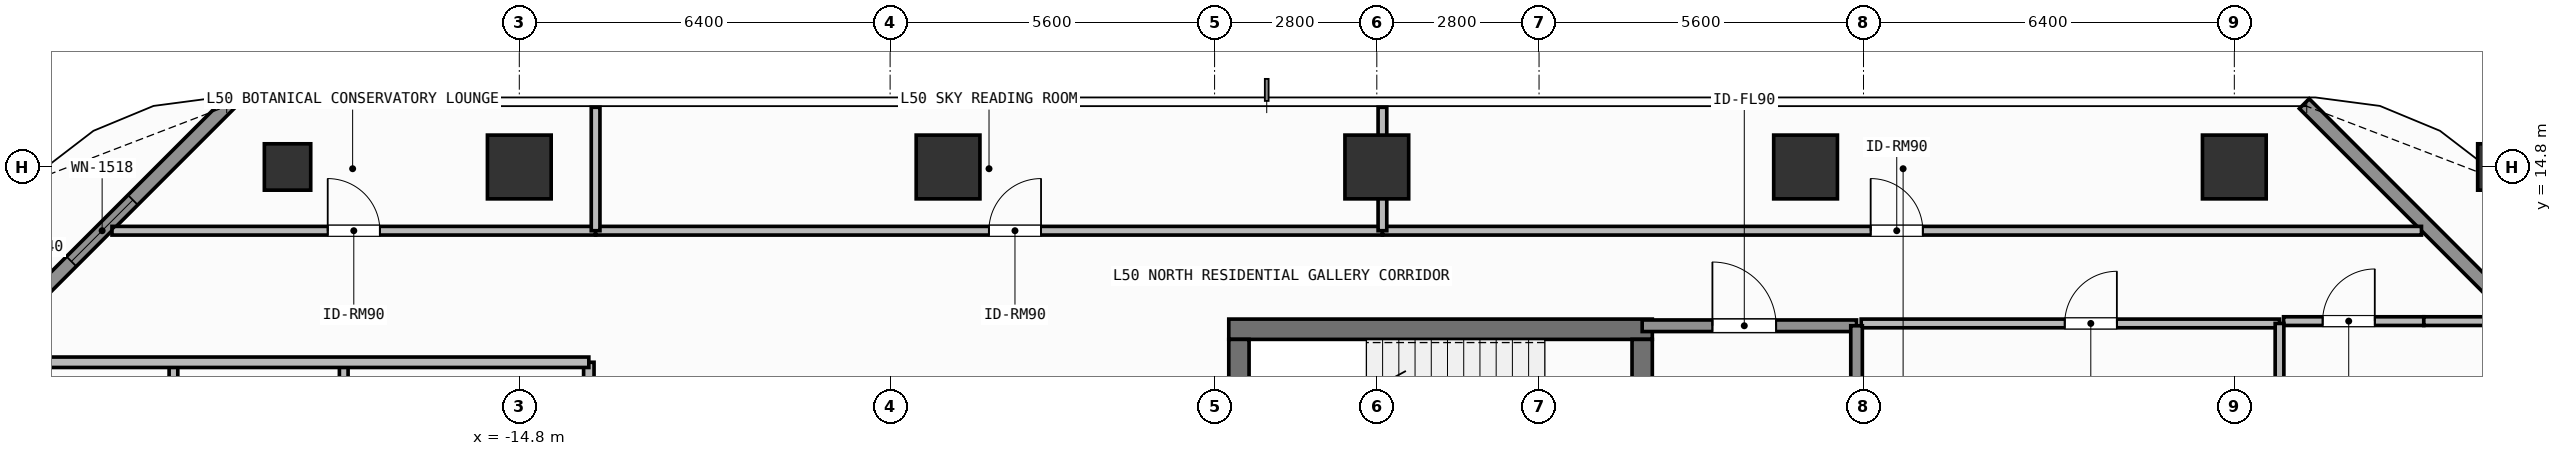
"""IFC4 building model, lengths in metres.
Left out: names, types, materials, properties, quantities, classifications, styles, units other than length and angle.
Written with IfcOpenShell. Run it as: python <this file> out.ifc"""

import sys

from ifc_helpers import new_model, si_unit, direction, frame, frame_2d, origin, origin_2d, place, context, subcontext, project, spatial, rectangle, hollow_rectangle, extrude, element, fill, save


model = new_model("IFC4")
c1 = context("Model", 3, precision=1e-05, world=origin(), true_north=direction((0.0, 1.0)))
c2 = subcontext(c1, "Body", "Model", "MODEL_VIEW")
j1 = project(units=[si_unit("LENGTHUNIT", "METRE"), si_unit("PLANEANGLEUNIT", "RADIAN")], contexts=[c1])
p1 = place(None, origin())
s1 = spatial("IfcSite", under=j1, at=p1, CompositionType="ELEMENT")
p2 = place(p1, origin())
s2 = spatial("IfcBuilding", under=s1, at=p2, CompositionType="ELEMENT")
p3 = place(p2, frame((0.0, 0.0, 203.1)))
s3 = spatial("IfcBuildingStorey", under=s2, at=p3, CompositionType="ELEMENT", Elevation=203.1)
p4 = place(p3, frame((-2.555, 12.0, 0.0), z_axis=(0.0, 0.0, 1.0), x_axis=(1.0, 0.0, 0.0)))
e1 = element("IfcWall", 1, at=p4, inside=s3, PredefinedType="SHEAR", context=c2, shape_type="SweptSolid", body=[
    extrude(rectangle(XDim=7.31, YDim=0.35, at=frame_2d((3.655, 0.0))), origin(), (0.0, 0.0, 1.0), 3.9),
])
p5 = place(p3, frame((-2.38, 8.9, 0.0), z_axis=(0.0, 0.0, 1.0), x_axis=(0.0, 1.0, 0.0)))
e2 = element("IfcWall", 2, at=p5, inside=s3, PredefinedType="SHEAR", context=c2, shape_type="SweptSolid", body=[
    extrude(rectangle(XDim=2.925, YDim=0.35, at=frame_2d((1.462, 0.0))), origin(), (0.0, 0.0, 1.0), 3.9),
])
p6 = place(p3, frame((4.58, 11.825, 0.0), z_axis=(0.0, 0.0, 1.0), x_axis=(0.0, -1.0, 0.0)))
e3 = element("IfcWall", 3, at=p6, inside=s3, PredefinedType="SHEAR", context=c2, shape_type="SweptSolid", body=[
    extrude(rectangle(XDim=2.925, YDim=0.35, at=frame_2d((1.462, 0.0))), origin(), (0.0, 0.0, 1.0), 3.9),
])
p7 = place(p6, frame((0.913, 0.0, 0.0)))
e4 = element("IfcOpeningElement", 4, at=p7, cuts=e3, PredefinedType="OPENING", context=c2, shape_type="SweptSolid", body=[
    extrude(rectangle(XDim=1.1, YDim=2.15, at=frame_2d((0.55, 1.075))), frame((0.0, 0.185, 0.0), z_axis=(0.0, -1.0, 0.0), x_axis=(1.0, 0.0, 0.0)), (0.0, 0.0, 1.0), 0.37),
])
for number, where, z_axis, x_axis in (
    (5, (-14.8, 14.8, 0.0), (0.0, 0.0, 1.0), (1.0, 0.0, 0.0)),
    (6, (-7.4, 14.8, 0.0), (0.0, 0.0, 1.0), (1.0, 0.0, 0.0)),
    (7, (0.0, 14.8, 0.0), (0.0, 0.0, 1.0), (1.0, 0.0, 0.0)),
    (8, (7.4, 14.8, 0.0), (0.0, 0.0, 1.0), (1.0, 0.0, 0.0)),
    (9, (14.8, 14.8, 0.0), (0.0, 0.0, 1.0), (1.0, 0.0, 0.0)),
):
    element("IfcColumn", number, at=place(p3, frame(where, z_axis=z_axis, x_axis=x_axis)), inside=s3, PredefinedType="COLUMN", context=c2, shape_type="SweptSolid", body=[
        extrude(rectangle(XDim=1.1, YDim=1.1, at=origin_2d()), origin(), (0.0, 0.0, 1.0), 3.9),
    ])
for number, where, z_axis, x_axis in (
    (10, (-18.8, 14.8, 0.0), (0.0, 0.0, 1.0), (1.0, 0.0, 0.0)),
    (11, (19.4, 14.8, 0.0), (0.0, 0.0, 1.0), (1.0, 0.0, 0.0)),
):
    element("IfcColumn", number, at=place(p3, frame(where, z_axis=z_axis, x_axis=x_axis)), inside=s3, PredefinedType="COLUMN", context=c2, shape_type="SweptSolid", body=[
        extrude(hollow_rectangle(XDim=0.8, YDim=0.8, WallThickness=0.036, at=origin_2d()), origin(), (0.0, 0.0, 1.0), 3.9),
    ])
p8 = place(p3, frame((-24.192, 11.508, 0.0), z_axis=(0.0, 0.0, 1.0), x_axis=(0.707106781187, 0.707106781187, 0.0)))
e12 = element("IfcWall", 12, at=p8, inside=s3, PredefinedType="SOLIDWALL", context=c2, shape_type="SweptSolid", body=[
    extrude(rectangle(XDim=6.201, YDim=0.24, at=frame_2d((3.101, 0.0))), origin(), (0.0, 0.0, 1.0), 3.68),
])
p9 = place(p8, frame((2.351, 0.0, 0.8)))
e13 = element("IfcOpeningElement", 13, at=p9, cuts=e12, PredefinedType="OPENING", context=c2, shape_type="SweptSolid", body=[
    extrude(rectangle(XDim=1.5, YDim=1.85, at=frame_2d((0.75, 0.925))), frame((0.0, 0.13, 0.0), z_axis=(0.0, -1.0, 0.0), x_axis=(1.0, 0.0, 0.0)), (0.0, 0.0, 1.0), 0.26),
])
p10 = place(p3, frame((16.008, 15.892, 0.0), z_axis=(0.0, 0.0, 1.0), x_axis=(0.707106781187, -0.707106781187, 0.0)))
e14 = element("IfcWall", 14, at=p10, inside=s3, PredefinedType="SOLIDWALL", context=c2, shape_type="SweptSolid", body=[
    extrude(rectangle(XDim=6.201, YDim=0.24, at=frame_2d((3.101, 0.0))), origin(), (0.0, 0.0, 1.0), 3.68),
])
p11 = place(p3, frame((4.58, 12.06, 0.0), z_axis=(0.0, 0.0, 1.0), x_axis=(1.0, 0.0, 0.0)))
e15 = element("IfcWall", 15, at=p11, inside=s3, PredefinedType="SOLIDWALL", context=c2, shape_type="SweptSolid", body=[
    extrude(rectangle(XDim=3.7, YDim=0.2, at=frame_2d((1.85, 0.0))), origin(), (0.0, 0.0, 1.0), 3.68),
])
p12 = place(p11, frame((1.212, 0.0, 0.0)))
e16 = element("IfcOpeningElement", 16, at=p12, cuts=e15, PredefinedType="OPENING", context=c2, shape_type="SweptSolid", body=[
    extrude(rectangle(XDim=1.1, YDim=2.15, at=frame_2d((0.55, 1.075))), frame((0.0, 0.11, 0.0), z_axis=(0.0, -1.0, 0.0), x_axis=(1.0, 0.0, 0.0)), (0.0, 0.0, 1.0), 0.22),
])
p13 = place(p3, frame((8.36, 12.1, 0.0), z_axis=(0.0, 0.0, 1.0), x_axis=(1.0, 0.0, 0.0)))
e17 = element("IfcWall", 17, at=p13, inside=s3, PredefinedType="PARTITIONING", context=c2, shape_type="SweptSolid", body=[
    extrude(rectangle(XDim=7.22, YDim=0.15, at=frame_2d((3.61, 0.0))), origin(), (0.0, 0.0, 1.0), 3.68),
])
p14 = place(p13, frame((3.513, 0.0, 0.0)))
e18 = element("IfcOpeningElement", 18, at=p14, cuts=e17, PredefinedType="OPENING", context=c2, shape_type="SweptSolid", body=[
    extrude(rectangle(XDim=0.9, YDim=2.1, at=frame_2d((0.45, 1.05))), frame((0.0, 0.085, 0.0), z_axis=(0.0, -1.0, 0.0), x_axis=(1.0, 0.0, 0.0)), (0.0, 0.0, 1.0), 0.17),
])
p15 = place(p3, frame((-21.83, 13.7, 0.0), z_axis=(0.0, 0.0, 1.0), x_axis=(1.0, 0.0, 0.0)))
e19 = element("IfcWall", 19, at=p15, inside=s3, PredefinedType="PARTITIONING", context=c2, shape_type="SweptSolid", body=[
    extrude(rectangle(XDim=8.347, YDim=0.15, at=frame_2d((4.174, 0.0))), origin(), (0.0, 0.0, 1.0), 3.68),
])
p16 = place(p15, frame((3.723, 0.0, 0.0)))
e20 = element("IfcOpeningElement", 20, at=p16, cuts=e19, PredefinedType="OPENING", context=c2, shape_type="SweptSolid", body=[
    extrude(rectangle(XDim=0.9, YDim=2.1, at=frame_2d((0.45, 1.05))), frame((0.0, 0.085, 0.0), z_axis=(0.0, -1.0, 0.0), x_axis=(1.0, 0.0, 0.0)), (0.0, 0.0, 1.0), 0.17),
])
p17 = place(p3, frame((-13.483, 13.7, 0.0), z_axis=(0.0, 0.0, 1.0), x_axis=(1.0, 0.0, 0.0)))
e21 = element("IfcWall", 21, at=p17, inside=s3, PredefinedType="PARTITIONING", context=c2, shape_type="SweptSolid", body=[
    extrude(rectangle(XDim=13.58, YDim=0.15, at=frame_2d((6.79, 0.0))), origin(), (0.0, 0.0, 1.0), 3.68),
])
p18 = place(p17, frame((6.788, 0.0, 0.0)))
e22 = element("IfcOpeningElement", 22, at=p18, cuts=e21, PredefinedType="OPENING", context=c2, shape_type="SweptSolid", body=[
    extrude(rectangle(XDim=0.9, YDim=2.1, at=frame_2d((0.45, 1.05))), frame((0.0, 0.085, 0.0), z_axis=(0.0, -1.0, 0.0), x_axis=(1.0, 0.0, 0.0)), (0.0, 0.0, 1.0), 0.17),
])
p19 = place(p3, frame((0.097, 13.7, 0.0), z_axis=(0.0, 0.0, 1.0), x_axis=(1.0, 0.0, 0.0)))
e23 = element("IfcWall", 23, at=p19, inside=s3, PredefinedType="PARTITIONING", context=c2, shape_type="SweptSolid", body=[
    extrude(rectangle(XDim=17.933, YDim=0.15, at=frame_2d((8.967, 0.0))), origin(), (0.0, 0.0, 1.0), 3.68),
])
p20 = place(p19, frame((8.427, 0.0, 0.0)))
e24 = element("IfcOpeningElement", 24, at=p20, cuts=e23, PredefinedType="OPENING", context=c2, shape_type="SweptSolid", body=[
    extrude(rectangle(XDim=0.9, YDim=2.1, at=frame_2d((0.45, 1.05))), frame((0.0, 0.085, 0.0), z_axis=(0.0, -1.0, 0.0), x_axis=(1.0, 0.0, 0.0)), (0.0, 0.0, 1.0), 0.17),
])
p21 = place(p3, frame((-13.6, -12.12, 0.0), z_axis=(0.0, 0.0, 1.0), x_axis=(0.0, 1.0, 0.0)))
e25 = element("IfcWall", 25, at=p21, inside=s3, PredefinedType="PARTITIONING", context=c2, shape_type="SweptSolid", body=[
    extrude(rectangle(XDim=23.55, YDim=0.18, at=frame_2d((11.775, 0.0))), origin(), (0.0, 0.0, 1.0), 3.68),
])
p22 = place(p21, frame((11.454, 0.0, 0.0)))
e26 = element("IfcOpeningElement", 26, at=p22, cuts=e25, PredefinedType="OPENING", context=c2, shape_type="SweptSolid", body=[
    extrude(rectangle(XDim=1.0, YDim=2.2, at=frame_2d((0.5, 1.1))), frame((0.0, 0.1, 0.0), z_axis=(0.0, -1.0, 0.0), x_axis=(1.0, 0.0, 0.0)), (0.0, 0.0, 1.0), 0.2),
])
p23 = place(p3, frame((15.65, 12.14, 0.0), z_axis=(0.0, 0.0, 1.0), x_axis=(1.0, 0.0, 0.0)))
e27 = element("IfcWall", 27, at=p23, inside=s3, PredefinedType="PARTITIONING", context=c2, shape_type="SweptSolid", body=[
    extrude(rectangle(XDim=2.42, YDim=0.15, at=frame_2d((1.21, 0.0))), origin(), (0.0, 0.0, 1.0), 3.68),
])
p24 = place(p23, frame((0.674, 0.0, 0.0)))
e28 = element("IfcOpeningElement", 28, at=p24, cuts=e27, PredefinedType="OPENING", context=c2, shape_type="SweptSolid", body=[
    extrude(rectangle(XDim=0.9, YDim=2.1, at=frame_2d((0.45, 1.05))), frame((0.0, 0.085, 0.0), z_axis=(0.0, -1.0, 0.0), x_axis=(1.0, 0.0, 0.0)), (0.0, 0.0, 1.0), 0.17),
])
p25 = place(p3, frame((8.28, 8.8, 0.0), z_axis=(0.0, 0.0, 1.0), x_axis=(0.0, 1.0, 0.0)))
e29 = element("IfcWall", 29, at=p25, inside=s3, PredefinedType="SOLIDWALL", context=c2, shape_type="SweptSolid", body=[
    extrude(rectangle(XDim=3.26, YDim=0.2, at=frame_2d((1.63, 0.0))), origin(), (0.0, 0.0, 1.0), 3.68),
])
p26 = place(p3, frame((15.58, 5.85, 0.0), z_axis=(0.0, 0.0, 1.0), x_axis=(0.0, 1.0, 0.0)))
e30 = element("IfcWall", 30, at=p26, inside=s3, PredefinedType="PARTITIONING", context=c2, shape_type="SweptSolid", body=[
    extrude(rectangle(XDim=6.25, YDim=0.15, at=frame_2d((3.125, 0.0))), origin(), (0.0, 0.0, 1.0), 3.68),
])
for number, where, z_axis, x_axis in (
    (31, (-13.483, 13.7, 0.0), (0.0, 0.0, 1.0), (0.0, 1.0, 0.0)),
    (32, (0.097, 13.7, 0.0), (0.0, 0.0, 1.0), (0.0, 1.0, 0.0)),
):
    element("IfcWall", number, at=place(p3, frame(where, z_axis=z_axis, x_axis=x_axis)), inside=s3, PredefinedType="PARTITIONING", context=c2, shape_type="SweptSolid", body=[
        extrude(rectangle(XDim=2.13, YDim=0.15, at=frame_2d((1.065, 0.0))), origin(), (0.0, 0.0, 1.0), 3.68),
    ])
for number, where, z_axis, x_axis in (
    (33, (-17.83, 5.282, 0.0), (0.0, 0.0, 1.0), (0.0, 1.0, 0.0)),
    (34, (-20.769, 5.282, 0.0), (0.0, 0.0, 1.0), (0.0, 1.0, 0.0)),
):
    element("IfcWall", number, at=place(p3, frame(where, z_axis=z_axis, x_axis=x_axis)), inside=s3, PredefinedType="PARTITIONING", context=c2, shape_type="SweptSolid", body=[
        extrude(rectangle(XDim=6.148, YDim=0.15, at=frame_2d((3.074, 0.0))), origin(), (0.0, 0.0, 1.0), 3.68),
    ])
p27 = place(p3, frame((-24.13, 11.43, 0.0), z_axis=(0.0, 0.0, 1.0), x_axis=(1.0, 0.0, 0.0)))
e35 = element("IfcWall", 35, at=p27, inside=s3, PredefinedType="PARTITIONING", context=c2, shape_type="SweptSolid", body=[
    extrude(rectangle(XDim=10.53, YDim=0.18, at=frame_2d((5.265, 0.0))), origin(), (0.0, 0.0, 1.0), 3.42),
])
p28 = place(p3, frame((18.07, 12.14, 0.0), z_axis=(0.0, 0.0, 1.0), x_axis=(1.0, 0.0, 0.0)))
e36 = element("IfcWall", 36, at=p28, inside=s3, PredefinedType="PARTITIONING", context=c2, shape_type="SweptSolid", body=[
    extrude(rectangle(XDim=1.52, YDim=0.15, at=frame_2d((0.76, 0.0))), origin(), (0.0, 0.0, 1.0), 3.68),
])
p29 = place(p9, origin())
e37 = element("IfcWindow", 37, at=p29, inside=s3, PartitioningType="SINGLE_PANEL", PredefinedType="WINDOW", context=c2, shape_type="SweptSolid", body=[
    extrude(rectangle(XDim=1.5, YDim=1.85, at=frame_2d((0.75, 0.925))), frame((0.0, 0.03, 0.0), z_axis=(0.0, -1.0, 0.0), x_axis=(1.0, 0.0, 0.0)), (0.0, 0.0, 1.0), 0.06),
])
fill(e13, e37)
p30 = place(p12, origin())
e38 = element("IfcDoor", 38, at=p30, inside=s3, OperationType="SINGLE_SWING_LEFT", PredefinedType="DOOR", context=c2, shape_type="SweptSolid", body=[
    extrude(rectangle(XDim=1.1, YDim=2.15, at=frame_2d((0.55, 1.075))), frame((0.0, 0.025, 0.0), z_axis=(0.0, -1.0, 0.0), x_axis=(1.0, 0.0, 0.0)), (0.0, 0.0, 1.0), 0.05),
])
fill(e16, e38)
p31 = place(p14, origin())
e39 = element("IfcDoor", 39, at=p31, inside=s3, OperationType="SINGLE_SWING_RIGHT", PredefinedType="DOOR", context=c2, shape_type="SweptSolid", body=[
    extrude(rectangle(XDim=0.9, YDim=2.1, at=frame_2d((0.45, 1.05))), frame((0.0, 0.025, 0.0), z_axis=(0.0, -1.0, 0.0), x_axis=(1.0, 0.0, 0.0)), (0.0, 0.0, 1.0), 0.05),
])
fill(e18, e39)
p32 = place(p16, origin())
e40 = element("IfcDoor", 40, at=p32, inside=s3, OperationType="SINGLE_SWING_LEFT", PredefinedType="DOOR", context=c2, shape_type="SweptSolid", body=[
    extrude(rectangle(XDim=0.9, YDim=2.1, at=frame_2d((0.45, 1.05))), frame((0.0, 0.025, 0.0), z_axis=(0.0, -1.0, 0.0), x_axis=(1.0, 0.0, 0.0)), (0.0, 0.0, 1.0), 0.05),
])
fill(e20, e40)
p33 = place(p18, origin())
e41 = element("IfcDoor", 41, at=p33, inside=s3, OperationType="SINGLE_SWING_RIGHT", PredefinedType="DOOR", context=c2, shape_type="SweptSolid", body=[
    extrude(rectangle(XDim=0.9, YDim=2.1, at=frame_2d((0.45, 1.05))), frame((0.0, 0.025, 0.0), z_axis=(0.0, -1.0, 0.0), x_axis=(1.0, 0.0, 0.0)), (0.0, 0.0, 1.0), 0.05),
])
fill(e22, e41)
p34 = place(p20, origin())
e42 = element("IfcDoor", 42, at=p34, inside=s3, OperationType="SINGLE_SWING_LEFT", PredefinedType="DOOR", context=c2, shape_type="SweptSolid", body=[
    extrude(rectangle(XDim=0.9, YDim=2.1, at=frame_2d((0.45, 1.05))), frame((0.0, 0.025, 0.0), z_axis=(0.0, -1.0, 0.0), x_axis=(1.0, 0.0, 0.0)), (0.0, 0.0, 1.0), 0.05),
])
fill(e24, e42)
p35 = place(p24, origin())
e43 = element("IfcDoor", 43, at=p35, inside=s3, OperationType="SINGLE_SWING_RIGHT", PredefinedType="DOOR", context=c2, shape_type="SweptSolid", body=[
    extrude(rectangle(XDim=0.9, YDim=2.1, at=frame_2d((0.45, 1.05))), frame((0.0, 0.025, 0.0), z_axis=(0.0, -1.0, 0.0), x_axis=(1.0, 0.0, 0.0)), (0.0, 0.0, 1.0), 0.05),
])
fill(e28, e43)
save(model, sys.argv[1])
